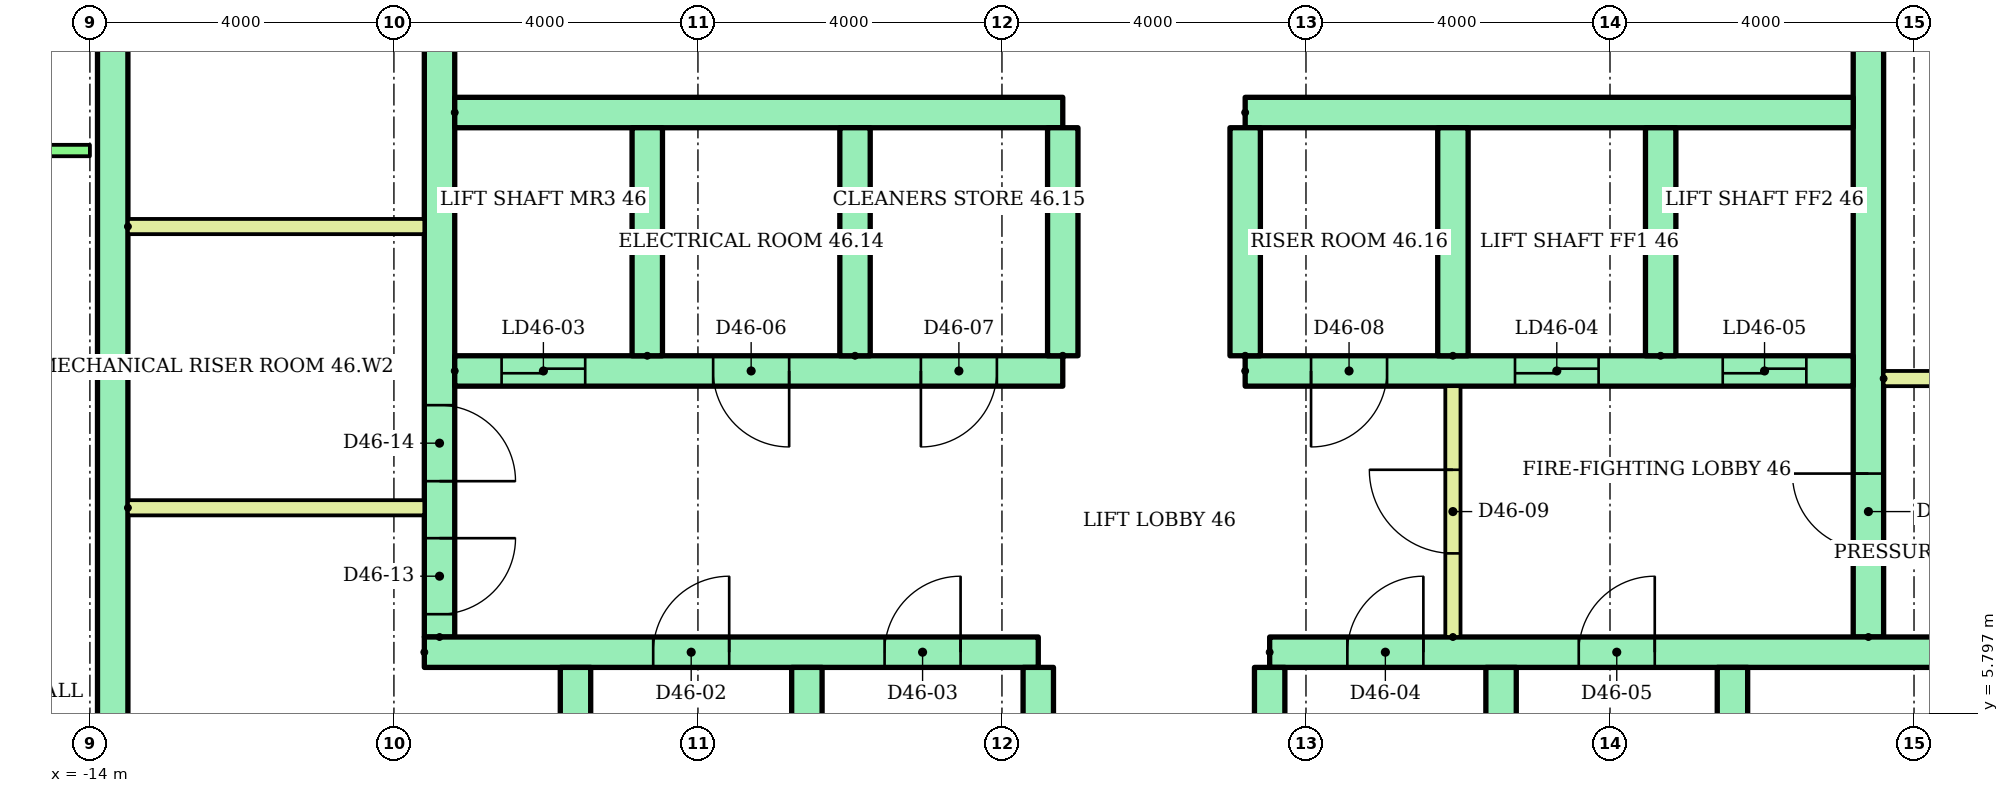
"""IFC4 building model, lengths in metres.
Left out: names, types, materials, properties, quantities, classifications, styles, units other than length and angle.
Written with IfcOpenShell. Run it as: python <this file> out.ifc"""

import sys

from ifc_helpers import new_model, si_unit, direction, frame, frame_2d, origin, place, context, subcontext, project, spatial, rectangle, extrude, element, fill, save


model = new_model("IFC4")
c1 = context("Model", 3, precision=1e-05, world=origin(), true_north=direction((0.0, 1.0)))
c2 = subcontext(c1, "Body", "Model", "MODEL_VIEW")
j1 = project(units=[si_unit("LENGTHUNIT", "METRE"), si_unit("PLANEANGLEUNIT", "RADIAN")], contexts=[c1])
p1 = place(None, origin())
s1 = spatial("IfcSite", under=j1, at=p1, CompositionType="ELEMENT")
p2 = place(p1, origin())
s2 = spatial("IfcBuilding", under=s1, at=p2, CompositionType="ELEMENT")
p3 = place(p2, frame((0.0, 0.0, 178.1)))
s3 = spatial("IfcBuildingStorey", under=s2, at=p3, CompositionType="ELEMENT", Elevation=178.1)
p4 = place(p3, frame((-13.7, 3.0, 0.0), z_axis=(0.0, 0.0, 1.0), x_axis=(0.0, 1.0, 0.0)))
e1 = element("IfcWall", 1, at=p4, inside=s3, PredefinedType="SHEAR", context=c2, shape_type="SweptSolid", body=[
    extrude(rectangle(XDim=17.0, YDim=0.4, at=frame_2d((8.5, 0.0))), origin(), (0.0, 0.0, 1.0), 2.92),
])
p5 = place(p3, frame((-9.4, 6.8, 0.0), z_axis=(0.0, 0.0, 1.0), x_axis=(0.0, 1.0, 0.0)))
e2 = element("IfcWall", 2, at=p5, inside=s3, PredefinedType="SHEAR", context=c2, shape_type="SweptSolid", body=[
    extrude(rectangle(XDim=12.7, YDim=0.4, at=frame_2d((6.35, 0.0))), origin(), (0.0, 0.0, 1.0), 2.92),
])
p6 = place(p5, frame((0.3, 0.0, 0.0)))
e3 = element("IfcOpeningElement", 3, at=p6, cuts=e2, PredefinedType="OPENING", context=c2, shape_type="SweptSolid", body=[
    extrude(rectangle(XDim=1.0, YDim=2.1, at=frame_2d((0.5, 1.05))), frame((0.0, 0.21, 0.0), z_axis=(0.0, -1.0, 0.0), x_axis=(1.0, 0.0, 0.0)), (0.0, 0.0, 1.0), 0.42),
])
p7 = place(p5, frame((2.05, 0.0, 0.0)))
e4 = element("IfcOpeningElement", 4, at=p7, cuts=e2, PredefinedType="OPENING", context=c2, shape_type="SweptSolid", body=[
    extrude(rectangle(XDim=1.0, YDim=2.1, at=frame_2d((0.5, 1.05))), frame((0.0, 0.21, 0.0), z_axis=(0.0, -1.0, 0.0), x_axis=(1.0, 0.0, 0.0)), (0.0, 0.0, 1.0), 0.42),
])
p8 = place(p5, frame((7.925, 0.0, 0.0)))
e5 = element("IfcOpeningElement", 5, at=p8, cuts=e2, PredefinedType="OPENING", context=c2, shape_type="SweptSolid", body=[
    extrude(rectangle(XDim=1.0, YDim=2.1, at=frame_2d((0.5, 1.05))), frame((0.0, 0.21, 0.0), z_axis=(0.0, -1.0, 0.0), x_axis=(1.0, 0.0, 0.0)), (0.0, 0.0, 1.0), 0.42),
])
p9 = place(p3, frame((9.4, 6.8, 0.0), z_axis=(0.0, 0.0, 1.0), x_axis=(0.0, 1.0, 0.0)))
e6 = element("IfcWall", 6, at=p9, inside=s3, PredefinedType="SHEAR", context=c2, shape_type="SweptSolid", body=[
    extrude(rectangle(XDim=12.7, YDim=0.4, at=frame_2d((6.35, 0.0))), origin(), (0.0, 0.0, 1.0), 2.92),
])
p10 = place(p9, frame((1.15, 0.0, 0.0)))
e7 = element("IfcOpeningElement", 7, at=p10, cuts=e6, PredefinedType="OPENING", context=c2, shape_type="SweptSolid", body=[
    extrude(rectangle(XDim=1.0, YDim=2.1, at=frame_2d((0.5, 1.05))), frame((0.0, 0.21, 0.0), z_axis=(0.0, -1.0, 0.0), x_axis=(1.0, 0.0, 0.0)), (0.0, 0.0, 1.0), 0.42),
])
p11 = place(p9, frame((7.925, 0.0, 0.0)))
e8 = element("IfcOpeningElement", 8, at=p11, cuts=e6, PredefinedType="OPENING", context=c2, shape_type="SweptSolid", body=[
    extrude(rectangle(XDim=1.0, YDim=2.1, at=frame_2d((0.5, 1.05))), frame((0.0, 0.21, 0.0), z_axis=(0.0, -1.0, 0.0), x_axis=(1.0, 0.0, 0.0)), (0.0, 0.0, 1.0), 0.42),
])
p12 = place(p3, frame((-9.6, 6.6, 0.0)))
e9 = element("IfcWall", 9, at=p12, inside=s3, PredefinedType="SHEAR", context=c2, shape_type="SweptSolid", body=[
    extrude(rectangle(XDim=8.078, YDim=0.4, at=frame_2d((4.039, 0.0))), origin(), (0.0, 0.0, 1.0), 2.92),
])
p13 = place(p12, frame((3.011, 0.0, 0.0)))
e10 = element("IfcOpeningElement", 10, at=p13, cuts=e9, PredefinedType="OPENING", context=c2, shape_type="SweptSolid", body=[
    extrude(rectangle(XDim=1.0, YDim=2.1, at=frame_2d((0.5, 1.05))), frame((0.0, 0.21, 0.0), z_axis=(0.0, -1.0, 0.0), x_axis=(1.0, 0.0, 0.0)), (0.0, 0.0, 1.0), 0.42),
])
p14 = place(p12, frame((6.056, 0.0, 0.0)))
e11 = element("IfcOpeningElement", 11, at=p14, cuts=e9, PredefinedType="OPENING", context=c2, shape_type="SweptSolid", body=[
    extrude(rectangle(XDim=1.0, YDim=2.1, at=frame_2d((0.5, 1.05))), frame((0.0, 0.21, 0.0), z_axis=(0.0, -1.0, 0.0), x_axis=(1.0, 0.0, 0.0)), (0.0, 0.0, 1.0), 0.42),
])
p15 = place(p3, frame((1.522, 6.6, 0.0)))
e12 = element("IfcWall", 12, at=p15, inside=s3, PredefinedType="SHEAR", context=c2, shape_type="SweptSolid", body=[
    extrude(rectangle(XDim=11.978, YDim=0.4, at=frame_2d((5.989, 0.0))), origin(), (0.0, 0.0, 1.0), 2.92),
])
p16 = place(p15, frame((1.022, 0.0, 0.0)))
e13 = element("IfcOpeningElement", 13, at=p16, cuts=e12, PredefinedType="OPENING", context=c2, shape_type="SweptSolid", body=[
    extrude(rectangle(XDim=1.0, YDim=2.1, at=frame_2d((0.5, 1.05))), frame((0.0, 0.21, 0.0), z_axis=(0.0, -1.0, 0.0), x_axis=(1.0, 0.0, 0.0)), (0.0, 0.0, 1.0), 0.42),
])
p17 = place(p15, frame((4.067, 0.0, 0.0)))
e14 = element("IfcOpeningElement", 14, at=p17, cuts=e12, PredefinedType="OPENING", context=c2, shape_type="SweptSolid", body=[
    extrude(rectangle(XDim=1.0, YDim=2.1, at=frame_2d((0.5, 1.05))), frame((0.0, 0.21, 0.0), z_axis=(0.0, -1.0, 0.0), x_axis=(1.0, 0.0, 0.0)), (0.0, 0.0, 1.0), 0.42),
])
for number, where, z_axis, x_axis in (
    (15, (-7.611, 3.4, 0.0), (0.0, 0.0, 1.0), (0.0, 1.0, 0.0)),
    (16, (-4.567, 3.4, 0.0), (0.0, 0.0, 1.0), (0.0, 1.0, 0.0)),
    (17, (-1.522, 3.4, 0.0), (0.0, 0.0, 1.0), (0.0, 1.0, 0.0)),
    (18, (1.522, 3.4, 0.0), (0.0, 0.0, 1.0), (0.0, 1.0, 0.0)),
    (19, (4.567, 3.4, 0.0), (0.0, 0.0, 1.0), (0.0, 1.0, 0.0)),
    (20, (7.611, 3.4, 0.0), (0.0, 0.0, 1.0), (0.0, 1.0, 0.0)),
):
    element("IfcWall", number, at=place(p3, frame(where, z_axis=z_axis, x_axis=x_axis)), inside=s3, PredefinedType="SHEAR", context=c2, shape_type="SweptSolid", body=[
        extrude(rectangle(XDim=3.0, YDim=0.4, at=frame_2d((1.5, 0.0))), origin(), (0.0, 0.0, 1.0), 2.92),
    ])
p18 = place(p3, frame((-9.2, 10.3, 0.0)))
e21 = element("IfcWall", 21, at=p18, inside=s3, PredefinedType="SHEAR", context=c2, shape_type="SweptSolid", body=[
    extrude(rectangle(XDim=8.0, YDim=0.4, at=frame_2d((4.0, 0.0))), origin(), (0.0, 0.0, 1.0), 2.92),
])
p19 = place(p18, frame((0.617, 0.0, 0.0)))
e22 = element("IfcOpeningElement", 22, at=p19, cuts=e21, PredefinedType="OPENING", context=c2, shape_type="SweptSolid", body=[
    extrude(rectangle(XDim=1.1, YDim=2.1, at=frame_2d((0.55, 1.05))), frame((0.0, 0.21, 0.0), z_axis=(0.0, -1.0, 0.0), x_axis=(1.0, 0.0, 0.0)), (0.0, 0.0, 1.0), 0.42),
])
p20 = place(p18, frame((3.4, 0.0, 0.0)))
e23 = element("IfcOpeningElement", 23, at=p20, cuts=e21, PredefinedType="OPENING", context=c2, shape_type="SweptSolid", body=[
    extrude(rectangle(XDim=1.0, YDim=2.1, at=frame_2d((0.5, 1.05))), frame((0.0, 0.21, 0.0), z_axis=(0.0, -1.0, 0.0), x_axis=(1.0, 0.0, 0.0)), (0.0, 0.0, 1.0), 0.42),
])
p21 = place(p18, frame((6.133, 0.0, 0.0)))
e24 = element("IfcOpeningElement", 24, at=p21, cuts=e21, PredefinedType="OPENING", context=c2, shape_type="SweptSolid", body=[
    extrude(rectangle(XDim=1.0, YDim=2.1, at=frame_2d((0.5, 1.05))), frame((0.0, 0.21, 0.0), z_axis=(0.0, -1.0, 0.0), x_axis=(1.0, 0.0, 0.0)), (0.0, 0.0, 1.0), 0.42),
])
p22 = place(p3, frame((-9.2, 13.7, 0.0)))
e25 = element("IfcWall", 25, at=p22, inside=s3, PredefinedType="SHEAR", context=c2, shape_type="SweptSolid", body=[
    extrude(rectangle(XDim=8.0, YDim=0.4, at=frame_2d((4.0, 0.0))), origin(), (0.0, 0.0, 1.0), 2.92),
])
p23 = place(p3, frame((1.2, 10.3, 0.0)))
e26 = element("IfcWall", 26, at=p23, inside=s3, PredefinedType="SHEAR", context=c2, shape_type="SweptSolid", body=[
    extrude(rectangle(XDim=8.0, YDim=0.4, at=frame_2d((4.0, 0.0))), origin(), (0.0, 0.0, 1.0), 2.92),
])
p24 = place(p23, frame((3.55, 0.0, 0.0)))
e27 = element("IfcOpeningElement", 27, at=p24, cuts=e26, PredefinedType="OPENING", context=c2, shape_type="SweptSolid", body=[
    extrude(rectangle(XDim=1.1, YDim=2.1, at=frame_2d((0.55, 1.05))), frame((0.0, 0.21, 0.0), z_axis=(0.0, -1.0, 0.0), x_axis=(1.0, 0.0, 0.0)), (0.0, 0.0, 1.0), 0.42),
])
p25 = place(p23, frame((6.283, 0.0, 0.0)))
e28 = element("IfcOpeningElement", 28, at=p25, cuts=e26, PredefinedType="OPENING", context=c2, shape_type="SweptSolid", body=[
    extrude(rectangle(XDim=1.1, YDim=2.1, at=frame_2d((0.55, 1.05))), frame((0.0, 0.21, 0.0), z_axis=(0.0, -1.0, 0.0), x_axis=(1.0, 0.0, 0.0)), (0.0, 0.0, 1.0), 0.42),
])
p26 = place(p23, frame((0.867, 0.0, 0.0)))
e29 = element("IfcOpeningElement", 29, at=p26, cuts=e26, PredefinedType="OPENING", context=c2, shape_type="SweptSolid", body=[
    extrude(rectangle(XDim=1.0, YDim=2.1, at=frame_2d((0.5, 1.05))), frame((0.0, 0.21, 0.0), z_axis=(0.0, -1.0, 0.0), x_axis=(1.0, 0.0, 0.0)), (0.0, 0.0, 1.0), 0.42),
])
p27 = place(p3, frame((1.2, 13.7, 0.0)))
e30 = element("IfcWall", 30, at=p27, inside=s3, PredefinedType="SHEAR", context=c2, shape_type="SweptSolid", body=[
    extrude(rectangle(XDim=8.0, YDim=0.4, at=frame_2d((4.0, 0.0))), origin(), (0.0, 0.0, 1.0), 2.92),
])
for number, where, z_axis, x_axis in (
    (31, (-6.667, 10.5, 0.0), (0.0, 0.0, 1.0), (0.0, 1.0, 0.0)),
    (32, (-3.933, 10.5, 0.0), (0.0, 0.0, 1.0), (0.0, 1.0, 0.0)),
    (33, (-1.2, 10.5, 0.0), (0.0, 0.0, 1.0), (0.0, 1.0, 0.0)),
    (34, (1.2, 10.5, 0.0), (0.0, 0.0, 1.0), (0.0, 1.0, 0.0)),
    (35, (3.933, 10.5, 0.0), (0.0, 0.0, 1.0), (0.0, 1.0, 0.0)),
    (36, (6.667, 10.5, 0.0), (0.0, 0.0, 1.0), (0.0, 1.0, 0.0)),
):
    element("IfcWall", number, at=place(p3, frame(where, z_axis=z_axis, x_axis=x_axis)), inside=s3, PredefinedType="SHEAR", context=c2, shape_type="SweptSolid", body=[
        extrude(rectangle(XDim=3.0, YDim=0.4, at=frame_2d((1.5, 0.0))), origin(), (0.0, 0.0, 1.0), 2.92),
    ])
p28 = place(p3, frame((3.933, 6.8, 0.0), z_axis=(0.0, 0.0, 1.0), x_axis=(0.0, 1.0, 0.0)))
e37 = element("IfcWall", 37, at=p28, inside=s3, PredefinedType="PARTITIONING", context=c2, shape_type="SweptSolid", body=[
    extrude(rectangle(XDim=3.3, YDim=0.2, at=frame_2d((1.65, 0.0))), origin(), (0.0, 0.0, 1.0), 2.92),
])
p29 = place(p28, frame((1.1, 0.0, 0.0)))
e38 = element("IfcOpeningElement", 38, at=p29, cuts=e37, PredefinedType="OPENING", context=c2, shape_type="SweptSolid", body=[
    extrude(rectangle(XDim=1.1, YDim=2.1, at=frame_2d((0.55, 1.05))), frame((0.0, 0.11, 0.0), z_axis=(0.0, -1.0, 0.0), x_axis=(1.0, 0.0, 0.0)), (0.0, 0.0, 1.0), 0.22),
])
for number, where in (
    (39, (-13.5, 8.5, 0.0)),
    (40, (-13.5, 12.2, 0.0)),
    (41, (9.6, 10.2, 0.0)),
):
    element("IfcWall", number, at=place(p3, frame(where)), inside=s3, PredefinedType="PARTITIONING", context=c2, shape_type="SweptSolid", body=[
        extrude(rectangle(XDim=3.9, YDim=0.2, at=frame_2d((1.95, 0.0))), origin(), (0.0, 0.0, 1.0), 2.92),
    ])
p30 = place(p3, frame((-24.82, 13.2, 0.0)))
e42 = element("IfcWall", 42, at=p30, inside=s3, PredefinedType="PARTITIONING", context=c2, shape_type="SweptSolid", body=[
    extrude(rectangle(XDim=10.82, YDim=0.15, at=frame_2d((5.41, 0.0))), origin(), (0.0, 0.0, 1.0), 2.4),
])
p31 = place(p30, frame((1.97, 0.0, 0.0)))
e43 = element("IfcOpeningElement", 43, at=p31, cuts=e42, PredefinedType="OPENING", context=c2, shape_type="SweptSolid", body=[
    extrude(rectangle(XDim=1.0, YDim=2.1, at=frame_2d((0.5, 1.05))), frame((0.0, 0.085, 0.0), z_axis=(0.0, -1.0, 0.0), x_axis=(1.0, 0.0, 0.0)), (0.0, 0.0, 1.0), 0.17),
])
p32 = place(p30, frame((7.27, 0.0, 0.0)))
e44 = element("IfcOpeningElement", 44, at=p32, cuts=e42, PredefinedType="OPENING", context=c2, shape_type="SweptSolid", body=[
    extrude(rectangle(XDim=1.0, YDim=2.1, at=frame_2d((0.5, 1.05))), frame((0.0, 0.085, 0.0), z_axis=(0.0, -1.0, 0.0), x_axis=(1.0, 0.0, 0.0)), (0.0, 0.0, 1.0), 0.17),
])
p33 = place(p13, origin())
e45 = element("IfcDoor", 45, at=p33, inside=s3, OperationType="SINGLE_SWING_RIGHT", PredefinedType="DOOR", context=c2, shape_type="SweptSolid", body=[
    extrude(rectangle(XDim=1.0, YDim=2.1, at=frame_2d((0.5, 1.05))), frame((0.0, 0.025, 0.0), z_axis=(0.0, -1.0, 0.0), x_axis=(1.0, 0.0, 0.0)), (0.0, 0.0, 1.0), 0.05),
])
fill(e10, e45)
p34 = place(p14, origin())
e46 = element("IfcDoor", 46, at=p34, inside=s3, OperationType="SINGLE_SWING_RIGHT", PredefinedType="DOOR", context=c2, shape_type="SweptSolid", body=[
    extrude(rectangle(XDim=1.0, YDim=2.1, at=frame_2d((0.5, 1.05))), frame((0.0, 0.025, 0.0), z_axis=(0.0, -1.0, 0.0), x_axis=(1.0, 0.0, 0.0)), (0.0, 0.0, 1.0), 0.05),
])
fill(e11, e46)
p35 = place(p16, origin())
e47 = element("IfcDoor", 47, at=p35, inside=s3, OperationType="SINGLE_SWING_RIGHT", PredefinedType="DOOR", context=c2, shape_type="SweptSolid", body=[
    extrude(rectangle(XDim=1.0, YDim=2.1, at=frame_2d((0.5, 1.05))), frame((0.0, 0.025, 0.0), z_axis=(0.0, -1.0, 0.0), x_axis=(1.0, 0.0, 0.0)), (0.0, 0.0, 1.0), 0.05),
])
fill(e13, e47)
p36 = place(p17, origin())
e48 = element("IfcDoor", 48, at=p36, inside=s3, OperationType="SINGLE_SWING_RIGHT", PredefinedType="DOOR", context=c2, shape_type="SweptSolid", body=[
    extrude(rectangle(XDim=1.0, YDim=2.1, at=frame_2d((0.5, 1.05))), frame((0.0, 0.025, 0.0), z_axis=(0.0, -1.0, 0.0), x_axis=(1.0, 0.0, 0.0)), (0.0, 0.0, 1.0), 0.05),
])
fill(e14, e48)
p37 = place(p19, origin())
e49 = element("IfcDoor", 49, at=p37, inside=s3, OperationType="SLIDING_TO_LEFT", PredefinedType="DOOR", context=c2, shape_type="SweptSolid", body=[
    extrude(rectangle(XDim=1.1, YDim=2.1, at=frame_2d((0.55, 1.05))), frame((0.0, 0.025, 0.0), z_axis=(0.0, -1.0, 0.0), x_axis=(1.0, 0.0, 0.0)), (0.0, 0.0, 1.0), 0.05),
])
fill(e22, e49)
p38 = place(p24, origin())
e50 = element("IfcDoor", 50, at=p38, inside=s3, OperationType="SLIDING_TO_LEFT", PredefinedType="DOOR", context=c2, shape_type="SweptSolid", body=[
    extrude(rectangle(XDim=1.1, YDim=2.1, at=frame_2d((0.55, 1.05))), frame((0.0, 0.025, 0.0), z_axis=(0.0, -1.0, 0.0), x_axis=(1.0, 0.0, 0.0)), (0.0, 0.0, 1.0), 0.05),
])
fill(e27, e50)
p39 = place(p25, origin())
e51 = element("IfcDoor", 51, at=p39, inside=s3, OperationType="SLIDING_TO_LEFT", PredefinedType="DOOR", context=c2, shape_type="SweptSolid", body=[
    extrude(rectangle(XDim=1.1, YDim=2.1, at=frame_2d((0.55, 1.05))), frame((0.0, 0.025, 0.0), z_axis=(0.0, -1.0, 0.0), x_axis=(1.0, 0.0, 0.0)), (0.0, 0.0, 1.0), 0.05),
])
fill(e28, e51)
p40 = place(p20, frame((1.0, 0.0, 0.0), z_axis=(0.0, 0.0, 1.0), x_axis=(-1.0, 0.0, 0.0)))
e52 = element("IfcDoor", 52, at=p40, inside=s3, OperationType="SINGLE_SWING_RIGHT", PredefinedType="DOOR", context=c2, shape_type="SweptSolid", body=[
    extrude(rectangle(XDim=1.0, YDim=2.1, at=frame_2d((0.5, 1.05))), frame((0.0, 0.025, 0.0), z_axis=(0.0, -1.0, 0.0), x_axis=(1.0, 0.0, 0.0)), (0.0, 0.0, 1.0), 0.05),
])
fill(e23, e52)
p41 = place(p21, frame((1.0, 0.0, 0.0), z_axis=(0.0, 0.0, 1.0), x_axis=(-1.0, 0.0, 0.0)))
e53 = element("IfcDoor", 53, at=p41, inside=s3, OperationType="SINGLE_SWING_LEFT", PredefinedType="DOOR", context=c2, shape_type="SweptSolid", body=[
    extrude(rectangle(XDim=1.0, YDim=2.1, at=frame_2d((0.5, 1.05))), frame((0.0, 0.025, 0.0), z_axis=(0.0, -1.0, 0.0), x_axis=(1.0, 0.0, 0.0)), (0.0, 0.0, 1.0), 0.05),
])
fill(e24, e53)
p42 = place(p26, frame((1.0, 0.0, 0.0), z_axis=(0.0, 0.0, 1.0), x_axis=(-1.0, 0.0, 0.0)))
e54 = element("IfcDoor", 54, at=p42, inside=s3, OperationType="SINGLE_SWING_LEFT", PredefinedType="DOOR", context=c2, shape_type="SweptSolid", body=[
    extrude(rectangle(XDim=1.0, YDim=2.1, at=frame_2d((0.5, 1.05))), frame((0.0, 0.025, 0.0), z_axis=(0.0, -1.0, 0.0), x_axis=(1.0, 0.0, 0.0)), (0.0, 0.0, 1.0), 0.05),
])
fill(e29, e54)
p43 = place(p29, origin())
e55 = element("IfcDoor", 55, at=p43, inside=s3, OperationType="SINGLE_SWING_RIGHT", PredefinedType="DOOR", context=c2, shape_type="SweptSolid", body=[
    extrude(rectangle(XDim=1.1, YDim=2.1, at=frame_2d((0.55, 1.05))), frame((0.0, 0.025, 0.0), z_axis=(0.0, -1.0, 0.0), x_axis=(1.0, 0.0, 0.0)), (0.0, 0.0, 1.0), 0.05),
])
fill(e38, e55)
p44 = place(p6, frame((1.0, 0.0, 0.0), z_axis=(0.0, 0.0, 1.0), x_axis=(-1.0, 0.0, 0.0)))
e56 = element("IfcDoor", 56, at=p44, inside=s3, OperationType="SINGLE_SWING_RIGHT", PredefinedType="DOOR", context=c2, shape_type="SweptSolid", body=[
    extrude(rectangle(XDim=1.0, YDim=2.1, at=frame_2d((0.5, 1.05))), frame((0.0, 0.025, 0.0), z_axis=(0.0, -1.0, 0.0), x_axis=(1.0, 0.0, 0.0)), (0.0, 0.0, 1.0), 0.05),
])
fill(e3, e56)
p45 = place(p7, frame((1.0, 0.0, 0.0), z_axis=(0.0, 0.0, 1.0), x_axis=(-1.0, 0.0, 0.0)))
e57 = element("IfcDoor", 57, at=p45, inside=s3, OperationType="SINGLE_SWING_LEFT", PredefinedType="DOOR", context=c2, shape_type="SweptSolid", body=[
    extrude(rectangle(XDim=1.0, YDim=2.1, at=frame_2d((0.5, 1.05))), frame((0.0, 0.025, 0.0), z_axis=(0.0, -1.0, 0.0), x_axis=(1.0, 0.0, 0.0)), (0.0, 0.0, 1.0), 0.05),
])
fill(e4, e57)
p46 = place(p10, origin())
e58 = element("IfcDoor", 58, at=p46, inside=s3, OperationType="SINGLE_SWING_RIGHT", PredefinedType="DOOR", context=c2, shape_type="SweptSolid", body=[
    extrude(rectangle(XDim=1.0, YDim=2.1, at=frame_2d((0.5, 1.05))), frame((0.0, 0.025, 0.0), z_axis=(0.0, -1.0, 0.0), x_axis=(1.0, 0.0, 0.0)), (0.0, 0.0, 1.0), 0.05),
])
fill(e7, e58)
save(model, sys.argv[1])
